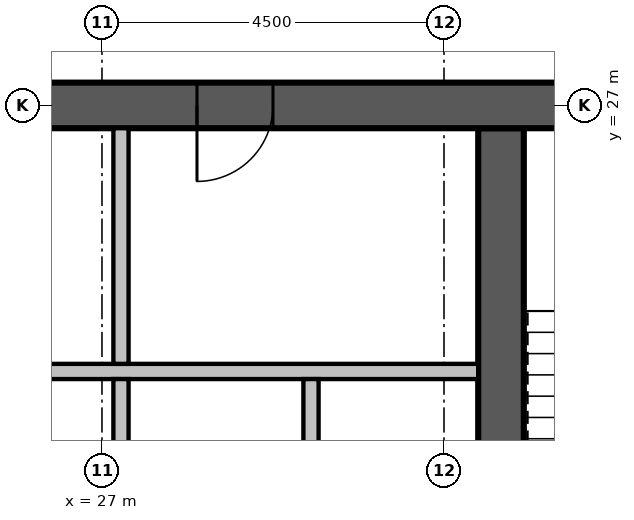
"""IFC4 building model, lengths in metres.
Left out: names, types, materials, properties, quantities, classifications, styles, units other than length and angle.
Written with IfcOpenShell. Run it as: python <this file> out.ifc"""

import sys

from ifc_helpers import new_model, si_unit, direction, frame, frame_2d, origin, place, context, subcontext, project, spatial, rectangle, extrude, element, fill, save


model = new_model("IFC4")
c1 = context("Model", 3, precision=1e-05, world=origin(), true_north=direction((0.0, 1.0)))
c2 = subcontext(c1, "Body", "Model", "MODEL_VIEW")
j1 = project(units=[si_unit("LENGTHUNIT", "METRE"), si_unit("PLANEANGLEUNIT", "RADIAN")], contexts=[c1])
p1 = place(None, origin())
s1 = spatial("IfcSite", under=j1, at=p1, CompositionType="ELEMENT")
p2 = place(p1, origin())
s2 = spatial("IfcBuilding", under=s1, at=p2, CompositionType="ELEMENT")
p3 = place(p2, frame((0.0, 0.0, 169.4)))
s3 = spatial("IfcBuildingStorey", under=s2, at=p3, CompositionType="ELEMENT", Elevation=169.4)
p4 = place(p3, frame((36.3, 27.0, 0.0), z_axis=(0.0, 0.0, 1.0), x_axis=(-1.0, 0.0, 0.0)))
e1 = element("IfcWall", 1, at=p4, inside=s3, PredefinedType="SHEAR", context=c2, shape_type="SweptSolid", body=[
    extrude(rectangle(XDim=23.1, YDim=0.6, at=frame_2d((11.55, 0.0))), origin(), (0.0, 0.0, 1.0), 3.5),
])
p5 = place(p4, frame((17.05, 0.0, 0.0)))
e2 = element("IfcOpeningElement", 2, at=p5, cuts=e1, PredefinedType="OPENING", context=c2, shape_type="SweptSolid", body=[
    extrude(rectangle(XDim=1.0, YDim=2.1, at=frame_2d((0.5, 1.05))), frame((0.0, 0.31, 0.0), z_axis=(0.0, -1.0, 0.0), x_axis=(1.0, 0.0, 0.0)), (0.0, 0.0, 1.0), 0.62),
])
p6 = place(p4, frame((12.05, 0.0, 0.0)))
e3 = element("IfcOpeningElement", 3, at=p6, cuts=e1, PredefinedType="OPENING", context=c2, shape_type="SweptSolid", body=[
    extrude(rectangle(XDim=1.0, YDim=2.1, at=frame_2d((0.5, 1.05))), frame((0.0, 0.31, 0.0), z_axis=(0.0, -1.0, 0.0), x_axis=(1.0, 0.0, 0.0)), (0.0, 0.0, 1.0), 0.62),
])
p7 = place(p4, frame((7.05, 0.0, 0.0)))
e4 = element("IfcOpeningElement", 4, at=p7, cuts=e1, PredefinedType="OPENING", context=c2, shape_type="SweptSolid", body=[
    extrude(rectangle(XDim=1.0, YDim=2.1, at=frame_2d((0.5, 1.05))), frame((0.0, 0.31, 0.0), z_axis=(0.0, -1.0, 0.0), x_axis=(1.0, 0.0, 0.0)), (0.0, 0.0, 1.0), 0.62),
])
p8 = place(p3, frame((32.25, 13.8, 0.0), z_axis=(0.0, 0.0, 1.0), x_axis=(0.0, 1.0, 0.0)))
e5 = element("IfcWall", 5, at=p8, inside=s3, PredefinedType="SHEAR", context=c2, shape_type="SweptSolid", body=[
    extrude(rectangle(XDim=12.9, YDim=0.6, at=frame_2d((6.45, 0.0))), origin(), (0.0, 0.0, 1.0), 3.5),
])
p9 = place(p8, frame((5.05, 0.0, 0.0), z_axis=(0.0, 0.0, 1.0), x_axis=(-1.0, 0.0, 0.0)))
e6 = element("IfcOpeningElement", 6, at=p9, cuts=e5, PredefinedType="OPENING", context=c2, shape_type="SweptSolid", body=[
    extrude(rectangle(XDim=1.2, YDim=2.1, at=frame_2d((0.6, 1.05))), frame((0.0, 0.31, 0.0), z_axis=(0.0, -1.0, 0.0), x_axis=(1.0, 0.0, 0.0)), (0.0, 0.0, 1.0), 0.62),
])
for number, where, z_axis, x_axis in (
    (7, (27.25, 20.3, 0.0), (0.0, 0.0, 1.0), (0.0, 1.0, 0.0)),
    (8, (29.75, 20.3, 0.0), (0.0, 0.0, 1.0), (0.0, 1.0, 0.0)),
):
    element("IfcWall", number, at=place(p3, frame(where, z_axis=z_axis, x_axis=x_axis)), inside=s3, PredefinedType="PARTITIONING", context=c2, shape_type="SweptSolid", body=[
        extrude(rectangle(XDim=3.1, YDim=0.2, at=frame_2d((1.55, 0.0))), origin(), (0.0, 0.0, 1.0), 3.25),
    ])
p10 = place(p3, frame((17.55, 23.5, 0.0), z_axis=(0.0, 0.0, 1.0), x_axis=(1.0, 0.0, 0.0)))
e9 = element("IfcWall", 9, at=p10, inside=s3, PredefinedType="PARTITIONING", context=c2, shape_type="SweptSolid", body=[
    extrude(rectangle(XDim=14.4, YDim=0.2, at=frame_2d((7.2, 0.0))), origin(), (0.0, 0.0, 1.0), 3.25),
])
p11 = place(p3, frame((27.25, 23.6, 0.0), z_axis=(0.0, 0.0, 1.0), x_axis=(0.0, 1.0, 0.0)))
e10 = element("IfcWall", 10, at=p11, inside=s3, PredefinedType="PARTITIONING", context=c2, shape_type="SweptSolid", body=[
    extrude(rectangle(XDim=3.1, YDim=0.2, at=frame_2d((1.55, 0.0))), origin(), (0.0, 0.0, 1.0), 3.25),
])
p12 = place(p7, origin())
e11 = element("IfcDoor", 11, at=p12, inside=s3, OperationType="SINGLE_SWING_RIGHT", PredefinedType="DOOR", context=c2, shape_type="SweptSolid", body=[
    extrude(rectangle(XDim=1.0, YDim=2.1, at=frame_2d((0.5, 1.05))), frame((0.0, 0.3, 0.0), z_axis=(0.0, -1.0, 0.0), x_axis=(1.0, 0.0, 0.0)), (0.0, 0.0, 1.0), 0.6),
])
fill(e4, e11)
save(model, sys.argv[1])
